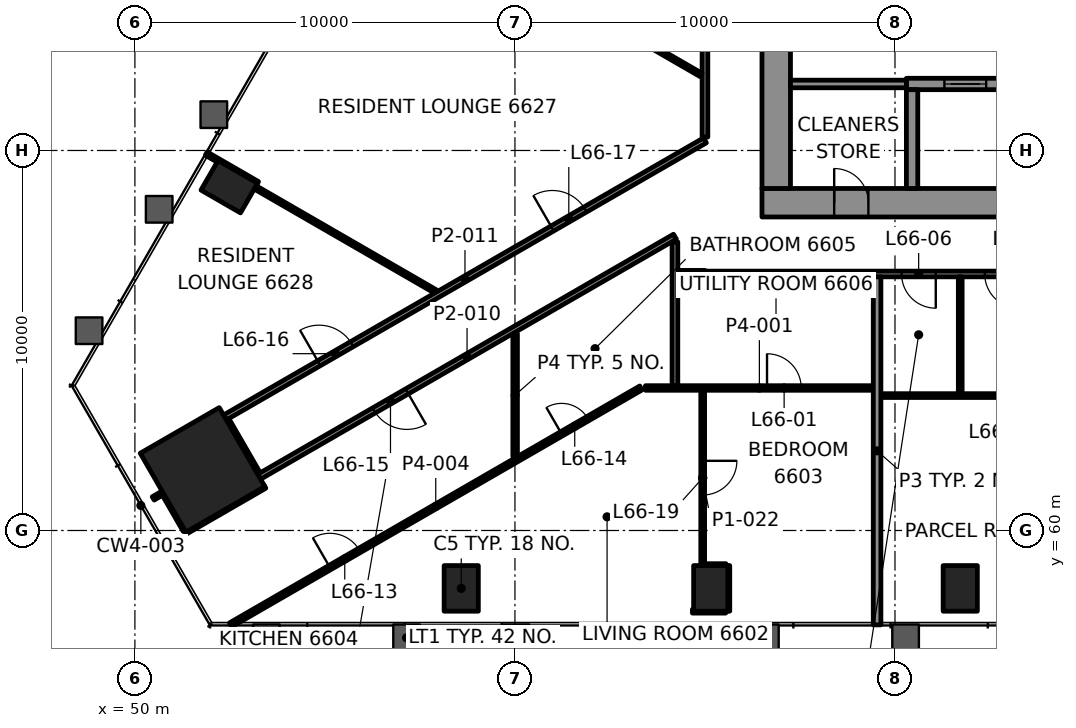
"""IFC4 building model, lengths in metres.
Left out: names, types, materials, properties, quantities, classifications, styles, units other than length and angle.
Written with IfcOpenShell. Run it as: python <this file> out.ifc"""

import sys

from ifc_helpers import new_model, si_unit, direction, frame, frame_2d, origin, origin_2d, place, context, subcontext, project, spatial, rectangle, hollow_rectangle, extrude, element, fill, save


model = new_model("IFC4")
c1 = context("Model", 3, precision=1e-05, world=origin(), true_north=direction((0.0, 1.0)))
c2 = subcontext(c1, "Body", "Model", "MODEL_VIEW")
j1 = project(units=[si_unit("LENGTHUNIT", "METRE"), si_unit("PLANEANGLEUNIT", "RADIAN")], contexts=[c1])
p1 = place(None, origin())
s1 = spatial("IfcSite", under=j1, at=p1, CompositionType="ELEMENT")
p2 = place(p1, origin())
s2 = spatial("IfcBuilding", under=s1, at=p2, CompositionType="ELEMENT")
p3 = place(p2, frame((0.0, 0.0, 277.6)))
s3 = spatial("IfcBuildingStorey", under=s2, at=p3, CompositionType="ELEMENT", Elevation=277.6)
p4 = place(p3, frame((51.78, 61.594, 0.0), z_axis=(0.0, 0.0, 1.0), x_axis=(0.5, -0.866025403784, 0.0)))
e1 = element("IfcColumn", 1, at=p4, inside=s3, PredefinedType="COLUMN", context=c2, shape_type="SweptSolid", body=[
    extrude(rectangle(XDim=2.4, YDim=2.4, at=origin_2d()), origin(), (0.0, 0.0, 1.0), 3.5),
])
for number, where, z_axis, x_axis in (
    (2, (58.587, 58.476, -0.0), (0.0, 0.0, 1.0), (1.0, 0.0, 0.0)),
    (3, (65.152, 58.476, -0.0), (0.0, 0.0, 1.0), (1.0, 0.0, 0.0)),
    (4, (71.717, 58.476, -0.0), (0.0, 0.0, 1.0), (1.0, 0.0, 0.0)),
    (5, (52.483, 69.047, -0.0), (0.0, 0.0, 1.0), (-0.5, -0.866, 0.0)),
):
    element("IfcColumn", number, at=place(p3, frame(where, z_axis=z_axis, x_axis=x_axis)), inside=s3, PredefinedType="COLUMN", context=c2, shape_type="SweptSolid", body=[
        extrude(hollow_rectangle(XDim=0.9, YDim=1.2, WallThickness=0.06, at=origin_2d()), origin(), (0.0, 0.0, 1.0), 3.5),
    ])
p5 = place(p3, frame((66.5, 68.625, 0.0), z_axis=(0.0, 0.0, 1.0), x_axis=(1.0, 0.0, 0.0)))
e6 = element("IfcWall", 6, at=p5, inside=s3, PredefinedType="SHEAR", context=c2, shape_type="SweptSolid", body=[
    extrude(rectangle(XDim=17.0, YDim=0.75, at=frame_2d((8.5, 0.0))), origin(), (0.0, 0.0, 1.0), 3.3),
])
p6 = place(p5, frame((1.9, 0.0, 0.0)))
e7 = element("IfcOpeningElement", 7, at=p6, cuts=e6, PredefinedType="OPENING", context=c2, shape_type="SweptSolid", body=[
    extrude(rectangle(XDim=0.9, YDim=2.1, at=frame_2d((0.45, 1.05))), frame((0.0, 0.385, 0.0), z_axis=(0.0, -1.0, 0.0), x_axis=(1.0, 0.0, 0.0)), (0.0, 0.0, 1.0), 0.77),
])
p7 = place(p3, frame((66.875, 69.0, 0.0), z_axis=(0.0, 0.0, 1.0), x_axis=(0.0, 1.0, 0.0)))
e8 = element("IfcWall", 8, at=p7, inside=s3, PredefinedType="SHEAR", context=c2, shape_type="SweptSolid", body=[
    extrude(rectangle(XDim=12.0, YDim=0.75, at=frame_2d((6.0, 0.0))), origin(), (0.0, 0.0, 1.0), 3.3),
])
p8 = place(p7, frame((3.7, 0.0, 0.0)))
e9 = element("IfcOpeningElement", 9, at=p8, cuts=e8, PredefinedType="OPENING", context=c2, shape_type="SweptSolid", body=[
    extrude(rectangle(XDim=1.2, YDim=2.1, at=frame_2d((0.6, 1.05))), frame((0.0, 0.385, 0.0), z_axis=(0.0, -1.0, 0.0), x_axis=(1.0, 0.0, 0.0)), (0.0, 0.0, 1.0), 0.77),
])
p9 = place(p3, frame((70.3, 71.75, 0.0), z_axis=(0.0, 0.0, 1.0), x_axis=(1.0, 0.0, 0.0)))
e10 = element("IfcWall", 10, at=p9, inside=s3, PredefinedType="SHEAR", context=c2, shape_type="SweptSolid", body=[
    extrude(rectangle(XDim=11.5, YDim=0.3, at=frame_2d((5.75, 0.0))), origin(), (0.0, 0.0, 1.0), 3.3),
])
p10 = place(p9, frame((1.0, 0.0, 0.0)))
e11 = element("IfcOpeningElement", 11, at=p10, cuts=e10, PredefinedType="OPENING", context=c2, shape_type="SweptSolid", body=[
    extrude(rectangle(XDim=1.1, YDim=2.1, at=frame_2d((0.55, 1.05))), frame((0.0, 0.16, 0.0), z_axis=(0.0, -1.0, 0.0), x_axis=(1.0, 0.0, 0.0)), (0.0, 0.0, 1.0), 0.32),
])
p11 = place(p9, frame((3.8, 0.0, 0.0)))
e12 = element("IfcOpeningElement", 12, at=p11, cuts=e10, PredefinedType="OPENING", context=c2, shape_type="SweptSolid", body=[
    extrude(rectangle(XDim=1.1, YDim=2.1, at=frame_2d((0.55, 1.05))), frame((0.0, 0.16, 0.0), z_axis=(0.0, -1.0, 0.0), x_axis=(1.0, 0.0, 0.0)), (0.0, 0.0, 1.0), 0.32),
])
p12 = place(p9, frame((6.6, 0.0, 0.0)))
e13 = element("IfcOpeningElement", 13, at=p12, cuts=e10, PredefinedType="OPENING", context=c2, shape_type="SweptSolid", body=[
    extrude(rectangle(XDim=1.1, YDim=2.1, at=frame_2d((0.55, 1.05))), frame((0.0, 0.16, 0.0), z_axis=(0.0, -1.0, 0.0), x_axis=(1.0, 0.0, 0.0)), (0.0, 0.0, 1.0), 0.32),
])
p13 = place(p9, frame((9.4, 0.0, 0.0)))
e14 = element("IfcOpeningElement", 14, at=p13, cuts=e10, PredefinedType="OPENING", context=c2, shape_type="SweptSolid", body=[
    extrude(rectangle(XDim=1.1, YDim=2.1, at=frame_2d((0.55, 1.05))), frame((0.0, 0.16, 0.0), z_axis=(0.0, -1.0, 0.0), x_axis=(1.0, 0.0, 0.0)), (0.0, 0.0, 1.0), 0.32),
])
p14 = place(p3, frame((70.45, 69.0, 0.0), z_axis=(0.0, 0.0, 1.0), x_axis=(0.0, 1.0, 0.0)))
e15 = element("IfcWall", 15, at=p14, inside=s3, PredefinedType="SHEAR", context=c2, shape_type="SweptSolid", body=[
    extrude(rectangle(XDim=2.6, YDim=0.3, at=frame_2d((1.3, 0.0))), origin(), (0.0, 0.0, 1.0), 3.3),
])
p15 = place(p3, frame((64.67, 57.876, 0.0), z_axis=(0.0, 0.0, 1.0), x_axis=(1.0, 0.0, 0.0)))
e16 = element("IfcWall", 16, at=p15, inside=s3, PredefinedType="PARTITIONING", context=c2, shape_type="SweptSolid", body=[
    extrude(rectangle(XDim=0.875, YDim=0.1, at=frame_2d((0.438, 0.0))), origin(), (0.0, 0.0, 1.0), 2.7),
])
p16 = place(p3, frame((64.99, 59.076, 0.0), z_axis=(0.0, 0.0, 1.0), x_axis=(1.0, 0.0, 0.0)))
e17 = element("IfcWall", 17, at=p16, inside=s3, PredefinedType="PARTITIONING", context=c2, shape_type="SweptSolid", body=[
    extrude(rectangle(XDim=0.562, YDim=0.1, at=frame_2d((0.281, 0.0))), origin(), (0.0, 0.0, 1.0), 2.7),
])
p17 = place(p3, frame((69.629, 63.55, 0.0), z_axis=(0.0, 0.0, 1.0), x_axis=(1.0, 0.0, 0.0)))
e18 = element("IfcWall", 18, at=p17, inside=s3, PredefinedType="PARTITIONING", context=c2, shape_type="SweptSolid", body=[
    extrude(rectangle(XDim=8.653, YDim=0.1, at=frame_2d((4.326, 0.0))), origin(), (0.0, 0.0, 1.0), 2.7),
])
p18 = place(p3, frame((63.434, 63.75, 0.0), z_axis=(0.0, 0.0, 1.0), x_axis=(1.0, 0.0, 0.0)))
e19 = element("IfcWall", 19, at=p18, inside=s3, PredefinedType="PARTITIONING", context=c2, shape_type="SweptSolid", body=[
    extrude(rectangle(XDim=5.995, YDim=0.12, at=frame_2d((2.997, 0.0))), origin(), (0.0, 0.0, 1.0), 2.7),
])
p19 = place(p18, frame((3.199, 0.0, 0.0)))
e20 = element("IfcOpeningElement", 20, at=p19, cuts=e19, PredefinedType="OPENING", context=c2, shape_type="SweptSolid", body=[
    extrude(rectangle(XDim=0.9, YDim=2.1, at=frame_2d((0.45, 1.05))), frame((0.0, 0.07, 0.0), z_axis=(0.0, -1.0, 0.0), x_axis=(1.0, 0.0, 0.0)), (0.0, 0.0, 1.0), 0.14),
])
p20 = place(p3, frame((85.0, 66.75, 0.0), z_axis=(0.0, 0.0, 1.0), x_axis=(-1.0, 0.0, 0.0)))
e21 = element("IfcWall", 21, at=p20, inside=s3, PredefinedType="PARTITIONING", context=c2, shape_type="SweptSolid", body=[
    extrude(rectangle(XDim=19.999, YDim=0.15, at=frame_2d((10.0, 0.0))), origin(), (0.0, 0.0, 1.0), 2.7),
])
p21 = place(p20, frame((2.96, 0.0, 0.0)))
e22 = element("IfcOpeningElement", 22, at=p21, cuts=e21, PredefinedType="OPENING", context=c2, shape_type="SweptSolid", body=[
    extrude(rectangle(XDim=1.0, YDim=2.1, at=frame_2d((0.5, 1.05))), frame((0.0, 0.085, 0.0), z_axis=(0.0, -1.0, 0.0), x_axis=(1.0, 0.0, 0.0)), (0.0, 0.0, 1.0), 0.17),
])
p22 = place(p20, frame((7.361, 0.0, 0.0)))
e23 = element("IfcOpeningElement", 23, at=p22, cuts=e21, PredefinedType="OPENING", context=c2, shape_type="SweptSolid", body=[
    extrude(rectangle(XDim=0.9, YDim=2.1, at=frame_2d((0.45, 1.05))), frame((0.0, 0.085, 0.0), z_axis=(0.0, -1.0, 0.0), x_axis=(1.0, 0.0, 0.0)), (0.0, 0.0, 1.0), 0.17),
])
p23 = place(p20, frame((9.55, 0.0, 0.0)))
e24 = element("IfcOpeningElement", 24, at=p23, cuts=e21, PredefinedType="OPENING", context=c2, shape_type="SweptSolid", body=[
    extrude(rectangle(XDim=0.9, YDim=2.1, at=frame_2d((0.45, 1.05))), frame((0.0, 0.085, 0.0), z_axis=(0.0, -1.0, 0.0), x_axis=(1.0, 0.0, 0.0)), (0.0, 0.0, 1.0), 0.17),
])
p24 = place(p20, frame((11.738, 0.0, 0.0)))
e25 = element("IfcOpeningElement", 25, at=p24, cuts=e21, PredefinedType="OPENING", context=c2, shape_type="SweptSolid", body=[
    extrude(rectangle(XDim=0.9, YDim=2.1, at=frame_2d((0.45, 1.05))), frame((0.0, 0.085, 0.0), z_axis=(0.0, -1.0, 0.0), x_axis=(1.0, 0.0, 0.0)), (0.0, 0.0, 1.0), 0.17),
])
p25 = place(p20, frame((13.926, 0.0, 0.0)))
e26 = element("IfcOpeningElement", 26, at=p25, cuts=e21, PredefinedType="OPENING", context=c2, shape_type="SweptSolid", body=[
    extrude(rectangle(XDim=0.9, YDim=2.1, at=frame_2d((0.45, 1.05))), frame((0.0, 0.085, 0.0), z_axis=(0.0, -1.0, 0.0), x_axis=(1.0, 0.0, 0.0)), (0.0, 0.0, 1.0), 0.17),
])
p26 = place(p3, frame((64.295, 66.769, 0.0), z_axis=(0.0, 0.0, 1.0), x_axis=(1.0, 0.0, 0.0)))
e27 = element("IfcWall", 27, at=p26, inside=s3, PredefinedType="PARTITIONING", context=c2, shape_type="SweptSolid", body=[
    extrude(rectangle(XDim=0.705, YDim=0.15, at=frame_2d((0.353, 0.0))), origin(), (0.0, 0.0, 1.0), 2.7),
])
p27 = place(p3, frame((52.517, 57.516, 0.0), z_axis=(0.0, 0.0, 1.0), x_axis=(0.866028080334, 0.499995364051, 0.0)))
e28 = element("IfcWall", 28, at=p27, inside=s3, PredefinedType="PARTITIONING", context=c2, shape_type="SweptSolid", body=[
    extrude(rectangle(XDim=12.467, YDim=0.12, at=frame_2d((6.234, 0.0))), origin(), (0.0, 0.0, 1.0), 2.7),
])
p28 = place(p27, frame((3.019, 0.0, 0.0)))
e29 = element("IfcOpeningElement", 29, at=p28, cuts=e28, PredefinedType="OPENING", context=c2, shape_type="SweptSolid", body=[
    extrude(rectangle(XDim=0.9, YDim=2.1, at=frame_2d((0.45, 1.05))), frame((0.0, 0.07, 0.0), z_axis=(0.0, -1.0, 0.0), x_axis=(1.0, 0.0, 0.0)), (0.0, 0.0, 1.0), 0.14),
])
p29 = place(p27, frame((10.057, 0.0, 0.0)))
e30 = element("IfcOpeningElement", 30, at=p29, cuts=e28, PredefinedType="OPENING", context=c2, shape_type="SweptSolid", body=[
    extrude(rectangle(XDim=0.8, YDim=2.1, at=frame_2d((0.4, 1.05))), frame((0.0, 0.07, 0.0), z_axis=(0.0, -1.0, 0.0), x_axis=(1.0, 0.0, 0.0)), (0.0, 0.0, 1.0), 0.14),
])
p30 = place(p3, frame((51.341, 59.955, 0.0), z_axis=(0.0, 0.0, 1.0), x_axis=(0.866036455013, 0.499980858223, 0.0)))
e31 = element("IfcWall", 31, at=p30, inside=s3, PredefinedType="PARTITIONING", context=c2, shape_type="SweptSolid", body=[
    extrude(rectangle(XDim=2.399, YDim=0.1, at=frame_2d((1.199, 0.0))), origin(), (0.0, 0.0, 1.0), 2.7),
])
p31 = place(p3, frame((64.21, 67.731, 0.0), z_axis=(0.0, 0.0, 1.0), x_axis=(-0.866027247007, -0.499996807431, 0.0)))
e32 = element("IfcWall", 32, at=p31, inside=s3, PredefinedType="PARTITIONING", context=c2, shape_type="SweptSolid", body=[
    extrude(rectangle(XDim=12.633, YDim=0.15, at=frame_2d((6.316, 0.0))), origin(), (0.0, 0.0, 1.0), 2.547),
])
p32 = place(p31, frame((8.143, 0.0, 0.0)))
e33 = element("IfcOpeningElement", 33, at=p32, cuts=e32, PredefinedType="OPENING", context=c2, shape_type="SweptSolid", body=[
    extrude(rectangle(XDim=1.0, YDim=2.1, at=frame_2d((0.5, 1.05))), frame((0.0, 0.085, 0.0), z_axis=(0.0, -1.0, 0.0), x_axis=(1.0, 0.0, 0.0)), (0.0, 0.0, 1.0), 0.17),
])
p33 = place(p3, frame((50.481, 60.844, 0.0), z_axis=(0.0, 0.0, 1.0), x_axis=(0.866429964967, 0.499298623879, 0.0)))
e34 = element("IfcWall", 34, at=p33, inside=s3, PredefinedType="PARTITIONING", context=c2, shape_type="SweptSolid", body=[
    extrude(rectangle(XDim=0.249, YDim=0.1, at=frame_2d((0.125, 0.0))), origin(), (0.0, 0.0, 1.0), 2.7),
])
p34 = place(p3, frame((52.37, 62.974, 0.0), z_axis=(0.0, 0.0, 1.0), x_axis=(0.866025849409, 0.499999228155, 0.0)))
e35 = element("IfcWall", 35, at=p34, inside=s3, PredefinedType="PARTITIONING", context=c2, shape_type="SweptSolid", body=[
    extrude(rectangle(XDim=14.584, YDim=0.15, at=frame_2d((7.292, 0.0))), origin(), (0.0, 0.0, 1.0), 2.7),
])
p35 = place(p34, frame((2.858, 0.0, 0.0)))
e36 = element("IfcOpeningElement", 36, at=p35, cuts=e35, PredefinedType="OPENING", context=c2, shape_type="SweptSolid", body=[
    extrude(rectangle(XDim=1.0, YDim=2.1, at=frame_2d((0.5, 1.05))), frame((0.0, 0.085, 0.0), z_axis=(0.0, -1.0, 0.0), x_axis=(1.0, 0.0, 0.0)), (0.0, 0.0, 1.0), 0.17),
])
p36 = place(p34, frame((9.947, 0.0, 0.0)))
e37 = element("IfcOpeningElement", 37, at=p36, cuts=e35, PredefinedType="OPENING", context=c2, shape_type="SweptSolid", body=[
    extrude(rectangle(XDim=1.0, YDim=2.1, at=frame_2d((0.5, 1.05))), frame((0.0, 0.085, 0.0), z_axis=(0.0, -1.0, 0.0), x_axis=(1.0, 0.0, 0.0)), (0.0, 0.0, 1.0), 0.17),
])
p37 = place(p3, frame((71.717, 63.6, 0.0), z_axis=(0.0, 0.0, 1.0), x_axis=(0.0, 1.0, 0.0)))
e38 = element("IfcWall", 38, at=p37, inside=s3, PredefinedType="PARTITIONING", context=c2, shape_type="SweptSolid", body=[
    extrude(rectangle(XDim=3.075, YDim=0.1, at=frame_2d((1.538, 0.0))), origin(), (0.0, 0.0, 1.0), 2.7),
])
p38 = place(p3, frame((69.529, 57.516, 0.0), z_axis=(0.0, 0.0, 1.0), x_axis=(0.0, 1.0, 0.0)))
e39 = element("IfcWall", 39, at=p38, inside=s3, PredefinedType="PARTITIONING", context=c2, shape_type="SweptSolid", body=[
    extrude(rectangle(XDim=9.159, YDim=0.2, at=frame_2d((4.579, 0.0))), origin(), (0.0, 0.0, 1.0), 2.688),
])
p39 = place(p3, frame((65.602, 57.876, 0.0), z_axis=(0.0, 0.0, 1.0), x_axis=(0.0, 1.0, 0.0)))
e40 = element("IfcWall", 40, at=p39, inside=s3, PredefinedType="PARTITIONING", context=c2, shape_type="SweptSolid", body=[
    extrude(rectangle(XDim=1.2, YDim=0.1, at=frame_2d((0.6, 0.0))), origin(), (0.0, 0.0, 1.0), 2.688),
])
p40 = place(p3, frame((65.0, 70.352, 0.0), z_axis=(0.0, 0.0, 1.0), x_axis=(0.0, 1.0, 0.0)))
e41 = element("IfcWall", 41, at=p40, inside=s3, PredefinedType="PARTITIONING", context=c2, shape_type="SweptSolid", body=[
    extrude(rectangle(XDim=12.898, YDim=0.15, at=frame_2d((6.449, 0.0))), origin(), (0.0, 0.0, 1.0), 2.7),
])
p41 = place(p3, frame((64.94, 63.69, 0.0), z_axis=(0.0, 0.0, 1.0), x_axis=(0.0, -1.0, 0.0)))
e42 = element("IfcWall", 42, at=p41, inside=s3, PredefinedType="PARTITIONING", context=c2, shape_type="SweptSolid", body=[
    extrude(rectangle(XDim=4.614, YDim=0.1, at=frame_2d((2.307, 0.0))), origin(), (0.0, 0.0, 1.0), 2.7),
])
p42 = place(p41, frame((1.857, 0.0, 0.0)))
e43 = element("IfcOpeningElement", 43, at=p42, cuts=e42, PredefinedType="OPENING", context=c2, shape_type="SweptSolid", body=[
    extrude(rectangle(XDim=0.9, YDim=2.1, at=frame_2d((0.45, 1.05))), frame((0.0, 0.06, 0.0), z_axis=(0.0, -1.0, 0.0), x_axis=(1.0, 0.0, 0.0)), (0.0, 0.0, 1.0), 0.12),
])
p43 = place(p3, frame((64.21, 63.81, 0.0), z_axis=(0.0, 0.0, 1.0), x_axis=(0.0, 1.0, 0.0)))
e44 = element("IfcWall", 44, at=p43, inside=s3, PredefinedType="PARTITIONING", context=c2, shape_type="SweptSolid", body=[
    extrude(rectangle(XDim=3.784, YDim=0.15, at=frame_2d((1.892, 0.0))), origin(), (0.0, 0.0, 1.0), 2.547),
])
p44 = place(p3, frame((60.005, 61.948, 0.0), z_axis=(0.0, 0.0, 1.0), x_axis=(0.0, 1.0, 0.0)))
e45 = element("IfcWall", 45, at=p44, inside=s3, PredefinedType="PARTITIONING", context=c2, shape_type="SweptSolid", body=[
    extrude(rectangle(XDim=3.228, YDim=0.12, at=frame_2d((1.614, 0.0))), origin(), (0.0, 0.0, 1.0), 2.547),
])
p45 = place(p3, frame((53.229, 61.484, 0.0), z_axis=(0.0, 0.0, 1.0), x_axis=(-0.500052415518, 0.865995139556, 0.0)))
e46 = element("IfcWall", 46, at=p45, inside=s3, PredefinedType="PARTITIONING", context=c2, shape_type="SweptSolid", body=[
    extrude(rectangle(XDim=1.644, YDim=0.15, at=frame_2d((0.822, 0.0))), origin(), (0.0, 0.0, 1.0), 2.547),
])
p46 = place(p3, frame((51.316, 59.999, 0.0), z_axis=(0.0, 0.0, 1.0), x_axis=(-0.499955427682, 0.866051136095, 0.0)))
e47 = element("IfcWall", 47, at=p46, inside=s3, PredefinedType="PARTITIONING", context=c2, shape_type="SweptSolid", body=[
    extrude(rectangle(XDim=1.149, YDim=0.1, at=frame_2d((0.574, 0.0))), origin(), (0.0, 0.0, 1.0), 2.7),
])
p47 = place(p3, frame((64.899, 71.987, 0.0), z_axis=(0.0, 0.0, 1.0), x_axis=(-0.866032610133, 0.499987518031, 0.0)))
e48 = element("IfcWall", 48, at=p47, inside=s3, PredefinedType="PARTITIONING", context=c2, shape_type="SweptSolid", body=[
    extrude(rectangle(XDim=3.295, YDim=0.1, at=frame_2d((1.648, 0.0))), origin(), (0.0, 0.0, 1.0), 2.7),
])
p48 = place(p3, frame((53.228, 69.138, 0.0), z_axis=(0.0, 0.0, 1.0), x_axis=(-0.866018739521, 0.500011542666, 0.0)))
e49 = element("IfcWall", 49, at=p48, inside=s3, PredefinedType="PARTITIONING", context=c2, shape_type="SweptSolid", body=[
    extrude(rectangle(XDim=1.56, YDim=0.1, at=frame_2d((0.78, 0.0))), origin(), (0.0, 0.0, 1.0), 2.7),
])
p49 = place(p3, frame((57.91, 66.289, 0.0), z_axis=(0.0, 0.0, 1.0), x_axis=(-0.866026762963, 0.499997645826, 0.0)))
e50 = element("IfcWall", 50, at=p49, inside=s3, PredefinedType="PARTITIONING", context=c2, shape_type="SweptSolid", body=[
    extrude(rectangle(XDim=5.478, YDim=0.1, at=frame_2d((2.739, 0.0))), origin(), (0.0, 0.0, 1.0), 2.7),
])
p50 = place(p3, frame((67.25, 71.75, 0.0), z_axis=(0.0, 0.0, 1.0), x_axis=(1.0, 0.0, 0.0)))
e51 = element("IfcWall", 51, at=p50, inside=s3, PredefinedType="PARTITIONING", context=c2, shape_type="SweptSolid", body=[
    extrude(rectangle(XDim=3.05, YDim=0.2, at=frame_2d((1.525, 0.0))), origin(), (0.0, 0.0, 1.0), 3.3),
])
p51 = place(p19, origin())
e52 = element("IfcDoor", 52, at=p51, inside=s3, OperationType="SINGLE_SWING_LEFT", PredefinedType="DOOR", context=c2, shape_type="SweptSolid", body=[
    extrude(rectangle(XDim=0.9, YDim=2.1, at=frame_2d((0.45, 1.05))), frame((0.0, 0.025, 0.0), z_axis=(0.0, -1.0, 0.0), x_axis=(1.0, 0.0, 0.0)), (0.0, 0.0, 1.0), 0.05),
])
fill(e20, e52)
p52 = place(p24, origin())
e53 = element("IfcDoor", 53, at=p52, inside=s3, OperationType="SINGLE_SWING_RIGHT", PredefinedType="DOOR", context=c2, shape_type="SweptSolid", body=[
    extrude(rectangle(XDim=0.9, YDim=2.1, at=frame_2d((0.45, 1.05))), frame((0.0, 0.025, 0.0), z_axis=(0.0, -1.0, 0.0), x_axis=(1.0, 0.0, 0.0)), (0.0, 0.0, 1.0), 0.05),
])
fill(e25, e53)
p53 = place(p25, origin())
e54 = element("IfcDoor", 54, at=p53, inside=s3, OperationType="SINGLE_SWING_LEFT", PredefinedType="DOOR", context=c2, shape_type="SweptSolid", body=[
    extrude(rectangle(XDim=0.9, YDim=2.1, at=frame_2d((0.45, 1.05))), frame((0.0, 0.025, 0.0), z_axis=(0.0, -1.0, 0.0), x_axis=(1.0, 0.0, 0.0)), (0.0, 0.0, 1.0), 0.05),
])
fill(e26, e54)
p54 = place(p28, origin())
e55 = element("IfcDoor", 55, at=p54, inside=s3, OperationType="SINGLE_SWING_LEFT", PredefinedType="DOOR", context=c2, shape_type="SweptSolid", body=[
    extrude(rectangle(XDim=0.9, YDim=2.1, at=frame_2d((0.45, 1.05))), frame((0.0, 0.025, 0.0), z_axis=(0.0, -1.0, 0.0), x_axis=(1.0, 0.0, 0.0)), (0.0, 0.0, 1.0), 0.05),
])
fill(e29, e55)
p55 = place(p29, origin())
e56 = element("IfcDoor", 56, at=p55, inside=s3, OperationType="SINGLE_SWING_RIGHT", PredefinedType="DOOR", context=c2, shape_type="SweptSolid", body=[
    extrude(rectangle(XDim=0.8, YDim=2.1, at=frame_2d((0.4, 1.05))), frame((0.0, 0.025, 0.0), z_axis=(0.0, -1.0, 0.0), x_axis=(1.0, 0.0, 0.0)), (0.0, 0.0, 1.0), 0.05),
])
fill(e30, e56)
p56 = place(p32, origin())
e57 = element("IfcDoor", 57, at=p56, inside=s3, OperationType="SINGLE_SWING_LEFT", PredefinedType="DOOR", context=c2, shape_type="SweptSolid", body=[
    extrude(rectangle(XDim=1.0, YDim=2.1, at=frame_2d((0.5, 1.05))), frame((0.0, 0.025, 0.0), z_axis=(0.0, -1.0, 0.0), x_axis=(1.0, 0.0, 0.0)), (0.0, 0.0, 1.0), 0.05),
])
fill(e33, e57)
p57 = place(p35, origin())
e58 = element("IfcDoor", 58, at=p57, inside=s3, OperationType="SINGLE_SWING_LEFT", PredefinedType="DOOR", context=c2, shape_type="SweptSolid", body=[
    extrude(rectangle(XDim=1.0, YDim=2.1, at=frame_2d((0.5, 1.05))), frame((0.0, 0.025, 0.0), z_axis=(0.0, -1.0, 0.0), x_axis=(1.0, 0.0, 0.0)), (0.0, 0.0, 1.0), 0.05),
])
fill(e36, e58)
p58 = place(p36, origin())
e59 = element("IfcDoor", 59, at=p58, inside=s3, OperationType="SINGLE_SWING_RIGHT", PredefinedType="DOOR", context=c2, shape_type="SweptSolid", body=[
    extrude(rectangle(XDim=1.0, YDim=2.1, at=frame_2d((0.5, 1.05))), frame((0.0, 0.025, 0.0), z_axis=(0.0, -1.0, 0.0), x_axis=(1.0, 0.0, 0.0)), (0.0, 0.0, 1.0), 0.05),
])
fill(e37, e59)
p59 = place(p42, origin())
e60 = element("IfcDoor", 60, at=p59, inside=s3, OperationType="SINGLE_SWING_RIGHT", PredefinedType="DOOR", context=c2, shape_type="SweptSolid", body=[
    extrude(rectangle(XDim=0.9, YDim=2.1, at=frame_2d((0.45, 1.05))), frame((0.0, 0.025, 0.0), z_axis=(0.0, -1.0, 0.0), x_axis=(1.0, 0.0, 0.0)), (0.0, 0.0, 1.0), 0.05),
])
fill(e43, e60)
p60 = place(p10, origin())
e61 = element("IfcDoor", 61, at=p60, inside=s3, OperationType="DOUBLE_DOOR_SLIDING", PredefinedType="DOOR", context=c2, shape_type="SweptSolid", body=[
    extrude(rectangle(XDim=1.1, YDim=2.1, at=frame_2d((0.55, 1.05))), frame((0.0, 0.025, 0.0), z_axis=(0.0, -1.0, 0.0), x_axis=(1.0, 0.0, 0.0)), (0.0, 0.0, 1.0), 0.05),
])
fill(e11, e61)
p61 = place(p6, origin())
e62 = element("IfcDoor", 62, at=p61, inside=s3, OperationType="SINGLE_SWING_RIGHT", PredefinedType="DOOR", context=c2, shape_type="SweptSolid", body=[
    extrude(rectangle(XDim=0.9, YDim=2.1, at=frame_2d((0.45, 1.05))), frame((0.0, 0.095, 0.0), z_axis=(0.0, -1.0, 0.0), x_axis=(1.0, 0.0, 0.0)), (0.0, 0.0, 1.0), 0.19),
])
fill(e7, e62)
save(model, sys.argv[1])
